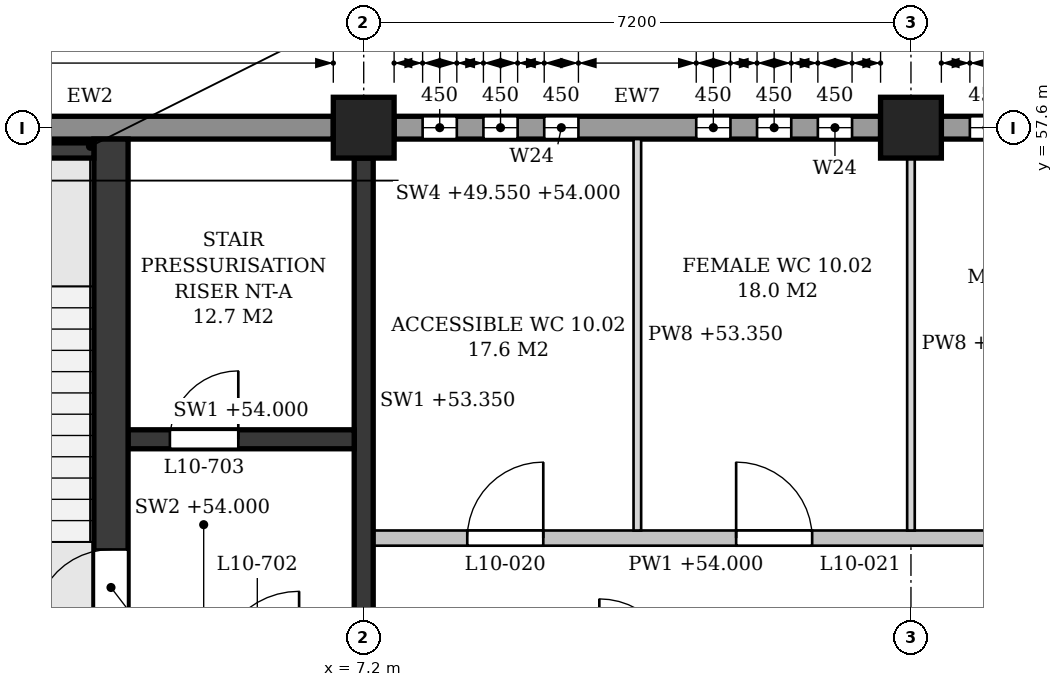
"""IFC4 building model, lengths in metres.
Left out: names, types, materials, properties, quantities, classifications, styles, units other than length and angle.
Written with IfcOpenShell. Run it as: python <this file> out.ifc"""

import sys

from ifc_helpers import new_model, si_unit, direction, frame, frame_2d, origin, origin_2d, place, context, subcontext, project, spatial, polyline, rectangle, outline, extrude, element, fill, save


model = new_model("IFC4")
c1 = context("Model", 3, precision=1e-05, world=origin(), true_north=direction((0.0, 1.0)))
c2 = subcontext(c1, "Body", "Model", "MODEL_VIEW")
j1 = project(units=[si_unit("LENGTHUNIT", "METRE"), si_unit("PLANEANGLEUNIT", "RADIAN")], contexts=[c1])
p1 = place(None, origin())
s1 = spatial("IfcSite", under=j1, at=p1, CompositionType="ELEMENT")
p2 = place(p1, origin())
s2 = spatial("IfcBuilding", under=s1, at=p2, CompositionType="ELEMENT")
p3 = place(p2, frame((0.0, 0.0, 49.8)))
s3 = spatial("IfcBuildingStorey", under=s2, at=p3, CompositionType="ELEMENT", Elevation=49.8)
for number, where, z_axis, x_axis in (
    (1, (7.2, 57.6, 0.0), (0.0, 0.0, 1.0), (1.0, 0.0, 0.0)),
    (2, (14.4, 57.6, 0.0), (0.0, 0.0, 1.0), (1.0, 0.0, 0.0)),
):
    element("IfcColumn", number, at=place(p3, frame(where, z_axis=z_axis, x_axis=x_axis)), inside=s3, PredefinedType="COLUMN", context=c2, shape_type="SweptSolid", body=[
        extrude(rectangle(XDim=0.8, YDim=0.8, at=origin_2d()), origin(), (0.0, 0.0, 1.0), 4.5),
    ])
p4 = place(p3, frame((21.2, 57.6, 0.0), z_axis=(0.0, 0.0, 1.0), x_axis=(-1.0, 0.0, 0.0)))
e3 = element("IfcWall", 3, at=p4, inside=s3, PredefinedType="STANDARD", context=c2, shape_type="SweptSolid", body=[
    extrude(rectangle(XDim=6.4, YDim=0.3, at=frame_2d((3.2, 0.0))), origin(), (0.0, 0.0, 1.0), 3.6),
])
p5 = place(p4, frame((0.375, 0.0, 0.9)))
e4 = element("IfcOpeningElement", 4, at=p5, cuts=e3, PredefinedType="OPENING", context=c2, shape_type="SweptSolid", body=[
    extrude(outline(polyline([(0.0, 0.0), (0.45, 0.0), (0.45, 2.35), (0.225, 2.6), (0.0, 2.35), (0.0, 0.0)])), frame((0.0, 0.16, 0.0), z_axis=(0.0, -1.0, 0.0), x_axis=(1.0, 0.0, 0.0)), (0.0, 0.0, 1.0), 0.32),
])
p6 = place(p4, frame((1.175, 0.0, 0.9)))
e5 = element("IfcOpeningElement", 5, at=p6, cuts=e3, PredefinedType="OPENING", context=c2, shape_type="SweptSolid", body=[
    extrude(outline(polyline([(0.0, 0.0), (0.45, 0.0), (0.45, 2.35), (0.225, 2.6), (0.0, 2.35), (0.0, 0.0)])), frame((0.0, 0.16, 0.0), z_axis=(0.0, -1.0, 0.0), x_axis=(1.0, 0.0, 0.0)), (0.0, 0.0, 1.0), 0.32),
])
p7 = place(p4, frame((1.975, 0.0, 0.9)))
e6 = element("IfcOpeningElement", 6, at=p7, cuts=e3, PredefinedType="OPENING", context=c2, shape_type="SweptSolid", body=[
    extrude(outline(polyline([(0.0, 0.0), (0.45, 0.0), (0.45, 2.35), (0.225, 2.6), (0.0, 2.35), (0.0, 0.0)])), frame((0.0, 0.16, 0.0), z_axis=(0.0, -1.0, 0.0), x_axis=(1.0, 0.0, 0.0)), (0.0, 0.0, 1.0), 0.32),
])
p8 = place(p4, frame((3.975, 0.0, 0.9)))
e7 = element("IfcOpeningElement", 7, at=p8, cuts=e3, PredefinedType="OPENING", context=c2, shape_type="SweptSolid", body=[
    extrude(outline(polyline([(0.0, 0.0), (0.45, 0.0), (0.45, 2.35), (0.225, 2.6), (0.0, 2.35), (0.0, 0.0)])), frame((0.0, 0.16, 0.0), z_axis=(0.0, -1.0, 0.0), x_axis=(1.0, 0.0, 0.0)), (0.0, 0.0, 1.0), 0.32),
])
p9 = place(p4, frame((4.775, 0.0, 0.9)))
e8 = element("IfcOpeningElement", 8, at=p9, cuts=e3, PredefinedType="OPENING", context=c2, shape_type="SweptSolid", body=[
    extrude(outline(polyline([(0.0, 0.0), (0.45, 0.0), (0.45, 2.35), (0.225, 2.6), (0.0, 2.35), (0.0, 0.0)])), frame((0.0, 0.16, 0.0), z_axis=(0.0, -1.0, 0.0), x_axis=(1.0, 0.0, 0.0)), (0.0, 0.0, 1.0), 0.32),
])
p10 = place(p4, frame((5.575, 0.0, 0.9)))
e9 = element("IfcOpeningElement", 9, at=p10, cuts=e3, PredefinedType="OPENING", context=c2, shape_type="SweptSolid", body=[
    extrude(outline(polyline([(0.0, 0.0), (0.45, 0.0), (0.45, 2.35), (0.225, 2.6), (0.0, 2.35), (0.0, 0.0)])), frame((0.0, 0.16, 0.0), z_axis=(0.0, -1.0, 0.0), x_axis=(1.0, 0.0, 0.0)), (0.0, 0.0, 1.0), 0.32),
])
p11 = place(p3, frame((14.0, 57.6, 0.0), z_axis=(0.0, 0.0, 1.0), x_axis=(-1.0, 0.0, 0.0)))
e10 = element("IfcWall", 10, at=p11, inside=s3, PredefinedType="STANDARD", context=c2, shape_type="SweptSolid", body=[
    extrude(rectangle(XDim=6.4, YDim=0.3, at=frame_2d((3.2, 0.0))), origin(), (0.0, 0.0, 1.0), 3.6),
])
p12 = place(p11, frame((0.375, 0.0, 0.9)))
e11 = element("IfcOpeningElement", 11, at=p12, cuts=e10, PredefinedType="OPENING", context=c2, shape_type="SweptSolid", body=[
    extrude(outline(polyline([(0.0, 0.0), (0.45, 0.0), (0.45, 2.35), (0.225, 2.6), (0.0, 2.35), (0.0, 0.0)])), frame((0.0, 0.16, 0.0), z_axis=(0.0, -1.0, 0.0), x_axis=(1.0, 0.0, 0.0)), (0.0, 0.0, 1.0), 0.32),
])
p13 = place(p11, frame((1.175, 0.0, 0.9)))
e12 = element("IfcOpeningElement", 12, at=p13, cuts=e10, PredefinedType="OPENING", context=c2, shape_type="SweptSolid", body=[
    extrude(outline(polyline([(0.0, 0.0), (0.45, 0.0), (0.45, 2.35), (0.225, 2.6), (0.0, 2.35), (0.0, 0.0)])), frame((0.0, 0.16, 0.0), z_axis=(0.0, -1.0, 0.0), x_axis=(1.0, 0.0, 0.0)), (0.0, 0.0, 1.0), 0.32),
])
p14 = place(p11, frame((1.975, 0.0, 0.9)))
e13 = element("IfcOpeningElement", 13, at=p14, cuts=e10, PredefinedType="OPENING", context=c2, shape_type="SweptSolid", body=[
    extrude(outline(polyline([(0.0, 0.0), (0.45, 0.0), (0.45, 2.35), (0.225, 2.6), (0.0, 2.35), (0.0, 0.0)])), frame((0.0, 0.16, 0.0), z_axis=(0.0, -1.0, 0.0), x_axis=(1.0, 0.0, 0.0)), (0.0, 0.0, 1.0), 0.32),
])
p15 = place(p11, frame((3.975, 0.0, 0.9)))
e14 = element("IfcOpeningElement", 14, at=p15, cuts=e10, PredefinedType="OPENING", context=c2, shape_type="SweptSolid", body=[
    extrude(outline(polyline([(0.0, 0.0), (0.45, 0.0), (0.45, 2.35), (0.225, 2.6), (0.0, 2.35), (0.0, 0.0)])), frame((0.0, 0.16, 0.0), z_axis=(0.0, -1.0, 0.0), x_axis=(1.0, 0.0, 0.0)), (0.0, 0.0, 1.0), 0.32),
])
p16 = place(p11, frame((4.775, 0.0, 0.9)))
e15 = element("IfcOpeningElement", 15, at=p16, cuts=e10, PredefinedType="OPENING", context=c2, shape_type="SweptSolid", body=[
    extrude(outline(polyline([(0.0, 0.0), (0.45, 0.0), (0.45, 2.35), (0.225, 2.6), (0.0, 2.35), (0.0, 0.0)])), frame((0.0, 0.16, 0.0), z_axis=(0.0, -1.0, 0.0), x_axis=(1.0, 0.0, 0.0)), (0.0, 0.0, 1.0), 0.32),
])
p17 = place(p11, frame((5.575, 0.0, 0.9)))
e16 = element("IfcOpeningElement", 16, at=p17, cuts=e10, PredefinedType="OPENING", context=c2, shape_type="SweptSolid", body=[
    extrude(outline(polyline([(0.0, 0.0), (0.45, 0.0), (0.45, 2.35), (0.225, 2.6), (0.0, 2.35), (0.0, 0.0)])), frame((0.0, 0.16, 0.0), z_axis=(0.0, -1.0, 0.0), x_axis=(1.0, 0.0, 0.0)), (0.0, 0.0, 1.0), 0.32),
])
p18 = place(p3, frame((6.8, 57.6, 0.0), z_axis=(0.0, 0.0, 1.0), x_axis=(-1.0, 0.0, 0.0)))
e17 = element("IfcWall", 17, at=p18, inside=s3, PredefinedType="STANDARD", context=c2, shape_type="SweptSolid", body=[
    extrude(rectangle(XDim=6.4, YDim=0.3, at=frame_2d((3.2, 0.0))), origin(), (0.0, 0.0, 1.0), 3.6),
])
p19 = place(p18, frame((4.55, 0.0, 0.9)))
e18 = element("IfcOpeningElement", 18, at=p19, cuts=e17, PredefinedType="OPENING", context=c2, shape_type="SweptSolid", body=[
    extrude(outline(polyline([(0.0, 0.0), (0.9, 0.0), (0.9, 2.15), (0.45, 2.6), (0.0, 2.15), (0.0, 0.0)])), frame((0.0, 0.16, 0.0), z_axis=(0.0, -1.0, 0.0), x_axis=(1.0, 0.0, 0.0)), (0.0, 0.0, 1.0), 0.32),
])
p20 = place(p3, frame((7.2, 50.8, 0.0), z_axis=(0.0, 0.0, 1.0), x_axis=(0.0, 1.0, 0.0)))
e19 = element("IfcWall", 19, at=p20, inside=s3, PredefinedType="SHEAR", context=c2, shape_type="SweptSolid", body=[
    extrude(rectangle(XDim=6.4, YDim=0.25, at=frame_2d((3.2, 0.0))), origin(), (0.0, 0.0, 1.0), 3.55),
])
p21 = place(p3, frame((2.25, 57.3, -0.25), z_axis=(0.0, 0.0, 1.0), x_axis=(1.0, 0.0, 0.0)))
e20 = element("IfcWall", 20, at=p21, inside=s3, PredefinedType="SHEAR", context=c2, shape_type="SweptSolid", body=[
    extrude(rectangle(XDim=1.4, YDim=0.2, at=frame_2d((0.7, 0.0))), origin(), (0.0, 0.0, 1.0), 4.45),
])
p22 = place(p3, frame((3.875, 50.525, 0.0), z_axis=(0.0, 0.0, 1.0), x_axis=(0.0, 1.0, 0.0)))
e21 = element("IfcWall", 21, at=p22, inside=s3, PredefinedType="SHEAR", context=c2, shape_type="SweptSolid", body=[
    extrude(rectangle(XDim=6.925, YDim=0.45, at=frame_2d((3.462, 0.0))), origin(), (0.0, 0.0, 1.0), 4.2),
])
p23 = place(p22, frame((0.525, 0.0, 0.0)))
e22 = element("IfcOpeningElement", 22, at=p23, cuts=e21, PredefinedType="OPENING", context=c2, shape_type="SweptSolid", body=[
    extrude(rectangle(XDim=1.0, YDim=2.1, at=frame_2d((0.5, 1.05))), frame((0.0, 0.235, 0.0), z_axis=(0.0, -1.0, 0.0), x_axis=(1.0, 0.0, 0.0)), (0.0, 0.0, 1.0), 0.47),
])
p24 = place(p3, frame((4.1, 53.5, 0.0), z_axis=(0.0, 0.0, 1.0), x_axis=(1.0, 0.0, 0.0)))
e23 = element("IfcWall", 23, at=p24, inside=s3, PredefinedType="SHEAR", context=c2, shape_type="SweptSolid", body=[
    extrude(rectangle(XDim=2.975, YDim=0.25, at=frame_2d((1.487, 0.0))), origin(), (0.0, 0.0, 1.0), 4.2),
])
p25 = place(p24, frame((0.55, 0.0, 0.0)))
e24 = element("IfcOpeningElement", 24, at=p25, cuts=e23, PredefinedType="OPENING", context=c2, shape_type="SweptSolid", body=[
    extrude(rectangle(XDim=0.9, YDim=2.1, at=frame_2d((0.45, 1.05))), frame((0.0, 0.135, 0.0), z_axis=(0.0, -1.0, 0.0), x_axis=(1.0, 0.0, 0.0)), (0.0, 0.0, 1.0), 0.27),
])
p26 = place(p3, frame((7.325, 52.2, 0.0), z_axis=(0.0, 0.0, 1.0), x_axis=(1.0, 0.0, 0.0)))
e25 = element("IfcWall", 25, at=p26, inside=s3, PredefinedType="PARTITIONING", context=c2, shape_type="SweptSolid", body=[
    extrude(outline(polyline([(0.0, 0.0), (14.15, 0.0), (14.15, 3.55), (14.05, 3.55), (14.05, 4.2), (7.3, 4.2), (7.3, 3.55), (6.85, 3.55), (6.85, 4.2), (0.1, 4.2), (0.1, 3.55), (0.0, 3.55), (0.0, 0.0)])), frame((0.0, 0.1, 0.0), z_axis=(0.0, -1.0, 0.0), x_axis=(1.0, 0.0, 0.0)), (0.0, 0.0, 1.0), 0.2),
])
p27 = place(p26, frame((1.238, 0.0, 0.0)))
e26 = element("IfcOpeningElement", 26, at=p27, cuts=e25, PredefinedType="OPENING", context=c2, shape_type="SweptSolid", body=[
    extrude(rectangle(XDim=1.0, YDim=2.1, at=frame_2d((0.5, 1.05))), frame((0.0, 0.11, 0.0), z_axis=(0.0, -1.0, 0.0), x_axis=(1.0, 0.0, 0.0)), (0.0, 0.0, 1.0), 0.22),
])
p28 = place(p26, frame((4.775, 0.0, 0.0)))
e27 = element("IfcOpeningElement", 27, at=p28, cuts=e25, PredefinedType="OPENING", context=c2, shape_type="SweptSolid", body=[
    extrude(rectangle(XDim=1.0, YDim=2.1, at=frame_2d((0.5, 1.05))), frame((0.0, 0.11, 0.0), z_axis=(0.0, -1.0, 0.0), x_axis=(1.0, 0.0, 0.0)), (0.0, 0.0, 1.0), 0.22),
])
p29 = place(p26, frame((8.375, 0.0, 0.0)))
e28 = element("IfcOpeningElement", 28, at=p29, cuts=e25, PredefinedType="OPENING", context=c2, shape_type="SweptSolid", body=[
    extrude(rectangle(XDim=1.0, YDim=2.1, at=frame_2d((0.5, 1.05))), frame((0.0, 0.11, 0.0), z_axis=(0.0, -1.0, 0.0), x_axis=(1.0, 0.0, 0.0)), (0.0, 0.0, 1.0), 0.22),
])
p30 = place(p26, frame((11.913, 0.0, 0.0)))
e29 = element("IfcOpeningElement", 29, at=p30, cuts=e25, PredefinedType="OPENING", context=c2, shape_type="SweptSolid", body=[
    extrude(rectangle(XDim=1.0, YDim=2.1, at=frame_2d((0.5, 1.05))), frame((0.0, 0.11, 0.0), z_axis=(0.0, -1.0, 0.0), x_axis=(1.0, 0.0, 0.0)), (0.0, 0.0, 1.0), 0.22),
])
p31 = place(p3, frame((10.8, 52.3, 0.0), z_axis=(0.0, 0.0, 1.0), x_axis=(0.0, 1.0, 0.0)))
e30 = element("IfcWall", 30, at=p31, inside=s3, PredefinedType="PARTITIONING", context=c2, shape_type="SweptSolid", body=[
    extrude(rectangle(XDim=5.15, YDim=0.1, at=frame_2d((2.575, 0.0))), origin(), (0.0, 0.0, 1.0), 3.55),
])
p32 = place(p3, frame((14.4, 52.3, 0.0), z_axis=(0.0, 0.0, 1.0), x_axis=(0.0, 1.0, 0.0)))
e31 = element("IfcWall", 31, at=p32, inside=s3, PredefinedType="PARTITIONING", context=c2, shape_type="SweptSolid", body=[
    extrude(rectangle(XDim=4.9, YDim=0.1, at=frame_2d((2.45, 0.0))), origin(), (0.0, 0.0, 1.0), 3.55),
])
p33 = place(p10, origin())
e32 = element("IfcWindow", 32, at=p33, inside=s3, PartitioningType="SINGLE_PANEL", PredefinedType="WINDOW", context=c2, shape_type="SweptSolid", body=[
    extrude(outline(polyline([(0.0, 0.0), (0.45, 0.0), (0.45, 2.35), (0.225, 2.6), (0.0, 2.35), (0.0, 0.0)])), frame((0.0, 0.03, 0.0), z_axis=(0.0, -1.0, 0.0), x_axis=(1.0, 0.0, 0.0)), (0.0, 0.0, 1.0), 0.06),
])
fill(e9, e32)
p34 = place(p12, origin())
e33 = element("IfcWindow", 33, at=p34, inside=s3, PartitioningType="SINGLE_PANEL", PredefinedType="WINDOW", context=c2, shape_type="SweptSolid", body=[
    extrude(outline(polyline([(0.0, 0.0), (0.45, 0.0), (0.45, 2.35), (0.225, 2.6), (0.0, 2.35), (0.0, 0.0)])), frame((0.0, 0.03, 0.0), z_axis=(0.0, -1.0, 0.0), x_axis=(1.0, 0.0, 0.0)), (0.0, 0.0, 1.0), 0.06),
])
fill(e11, e33)
p35 = place(p13, origin())
e34 = element("IfcWindow", 34, at=p35, inside=s3, PartitioningType="SINGLE_PANEL", PredefinedType="WINDOW", context=c2, shape_type="SweptSolid", body=[
    extrude(outline(polyline([(0.0, 0.0), (0.45, 0.0), (0.45, 2.35), (0.225, 2.6), (0.0, 2.35), (0.0, 0.0)])), frame((0.0, 0.03, 0.0), z_axis=(0.0, -1.0, 0.0), x_axis=(1.0, 0.0, 0.0)), (0.0, 0.0, 1.0), 0.06),
])
fill(e12, e34)
p36 = place(p14, origin())
e35 = element("IfcWindow", 35, at=p36, inside=s3, PartitioningType="SINGLE_PANEL", PredefinedType="WINDOW", context=c2, shape_type="SweptSolid", body=[
    extrude(outline(polyline([(0.0, 0.0), (0.45, 0.0), (0.45, 2.35), (0.225, 2.6), (0.0, 2.35), (0.0, 0.0)])), frame((0.0, 0.03, 0.0), z_axis=(0.0, -1.0, 0.0), x_axis=(1.0, 0.0, 0.0)), (0.0, 0.0, 1.0), 0.06),
])
fill(e13, e35)
p37 = place(p15, origin())
e36 = element("IfcWindow", 36, at=p37, inside=s3, PartitioningType="SINGLE_PANEL", PredefinedType="WINDOW", context=c2, shape_type="SweptSolid", body=[
    extrude(outline(polyline([(0.0, 0.0), (0.45, 0.0), (0.45, 2.35), (0.225, 2.6), (0.0, 2.35), (0.0, 0.0)])), frame((0.0, 0.03, 0.0), z_axis=(0.0, -1.0, 0.0), x_axis=(1.0, 0.0, 0.0)), (0.0, 0.0, 1.0), 0.06),
])
fill(e14, e36)
p38 = place(p16, origin())
e37 = element("IfcWindow", 37, at=p38, inside=s3, PartitioningType="SINGLE_PANEL", PredefinedType="WINDOW", context=c2, shape_type="SweptSolid", body=[
    extrude(outline(polyline([(0.0, 0.0), (0.45, 0.0), (0.45, 2.35), (0.225, 2.6), (0.0, 2.35), (0.0, 0.0)])), frame((0.0, 0.03, 0.0), z_axis=(0.0, -1.0, 0.0), x_axis=(1.0, 0.0, 0.0)), (0.0, 0.0, 1.0), 0.06),
])
fill(e15, e37)
p39 = place(p17, origin())
e38 = element("IfcWindow", 38, at=p39, inside=s3, PartitioningType="SINGLE_PANEL", PredefinedType="WINDOW", context=c2, shape_type="SweptSolid", body=[
    extrude(outline(polyline([(0.0, 0.0), (0.45, 0.0), (0.45, 2.35), (0.225, 2.6), (0.0, 2.35), (0.0, 0.0)])), frame((0.0, 0.03, 0.0), z_axis=(0.0, -1.0, 0.0), x_axis=(1.0, 0.0, 0.0)), (0.0, 0.0, 1.0), 0.06),
])
fill(e16, e38)
p40 = place(p23, origin())
e39 = element("IfcDoor", 39, at=p40, inside=s3, OperationType="SINGLE_SWING_LEFT", PredefinedType="DOOR", context=c2, shape_type="SweptSolid", body=[
    extrude(rectangle(XDim=1.0, YDim=2.1, at=frame_2d((0.5, 1.05))), frame((0.0, 0.025, 0.0), z_axis=(0.0, -1.0, 0.0), x_axis=(1.0, 0.0, 0.0)), (0.0, 0.0, 1.0), 0.05),
])
fill(e22, e39)
p41 = place(p25, origin())
e40 = element("IfcDoor", 40, at=p41, inside=s3, OperationType="SINGLE_SWING_RIGHT", PredefinedType="DOOR", context=c2, shape_type="SweptSolid", body=[
    extrude(rectangle(XDim=0.9, YDim=2.1, at=frame_2d((0.45, 1.05))), frame((0.0, 0.025, 0.0), z_axis=(0.0, -1.0, 0.0), x_axis=(1.0, 0.0, 0.0)), (0.0, 0.0, 1.0), 0.05),
])
fill(e24, e40)
p42 = place(p27, origin())
e41 = element("IfcDoor", 41, at=p42, inside=s3, OperationType="SINGLE_SWING_RIGHT", PredefinedType="DOOR", context=c2, shape_type="SweptSolid", body=[
    extrude(rectangle(XDim=1.0, YDim=2.1, at=frame_2d((0.5, 1.05))), frame((0.0, 0.025, 0.0), z_axis=(0.0, -1.0, 0.0), x_axis=(1.0, 0.0, 0.0)), (0.0, 0.0, 1.0), 0.05),
])
fill(e26, e41)
p43 = place(p28, origin())
e42 = element("IfcDoor", 42, at=p43, inside=s3, OperationType="SINGLE_SWING_LEFT", PredefinedType="DOOR", context=c2, shape_type="SweptSolid", body=[
    extrude(rectangle(XDim=1.0, YDim=2.1, at=frame_2d((0.5, 1.05))), frame((0.0, 0.025, 0.0), z_axis=(0.0, -1.0, 0.0), x_axis=(1.0, 0.0, 0.0)), (0.0, 0.0, 1.0), 0.05),
])
fill(e27, e42)
save(model, sys.argv[1])
